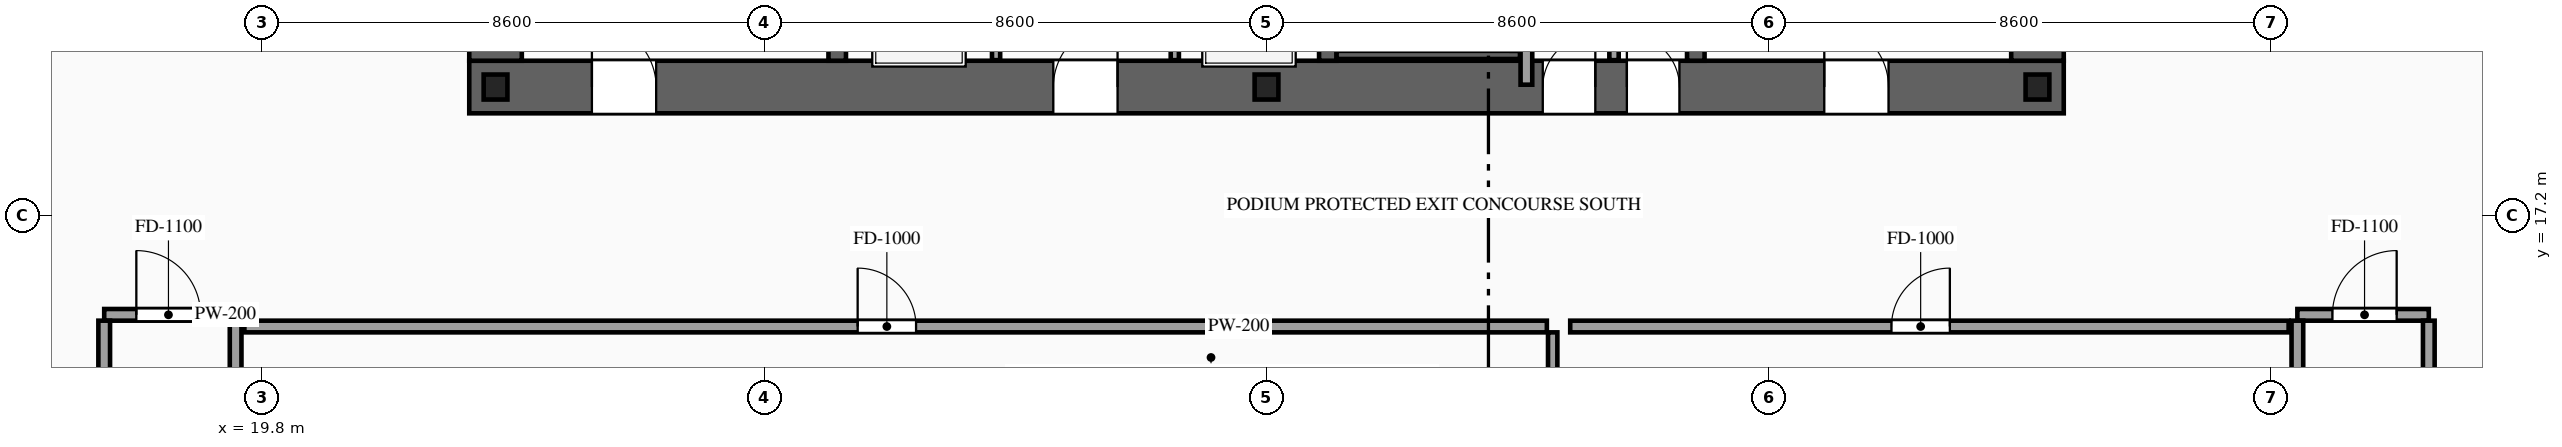
"""IFC4 building model, lengths in metres.
Left out: names, types, materials, properties, quantities, classifications, styles, units other than length and angle.
Written with IfcOpenShell. Run it as: python <this file> out.ifc"""

import sys

from ifc_helpers import new_model, si_unit, direction, frame, frame_2d, origin, origin_2d, place, context, subcontext, project, spatial, rectangle, i_section, extrude, source, transform, mapped, element, fill, save


model = new_model("IFC4")
c1 = context("Model", 3, precision=1e-05, world=origin(), true_north=direction((0.0, 1.0)))
c2 = subcontext(c1, "Body", "Model", "MODEL_VIEW")
j1 = project(units=[si_unit("LENGTHUNIT", "METRE"), si_unit("PLANEANGLEUNIT", "RADIAN")], contexts=[c1])
p1 = place(None, origin())
s1 = spatial("IfcSite", under=j1, at=p1, CompositionType="ELEMENT")
p2 = place(p1, origin())
s2 = spatial("IfcBuilding", under=s1, at=p2, CompositionType="ELEMENT")
p3 = place(p2, origin())
s3 = spatial("IfcBuildingStorey", under=s2, at=p3, CompositionType="ELEMENT", Elevation=0.0)
p4 = place(p3, frame((23.35, 19.4, 0.0), z_axis=(0.0, 0.0, 1.0), x_axis=(1.0, 0.0, 0.0)))
e1 = element("IfcWall", 1, at=p4, inside=s3, PredefinedType="SHEAR", context=c2, shape_type="SweptSolid", body=[
    extrude(rectangle(XDim=27.3, YDim=0.9, at=frame_2d((13.65, 0.0))), origin(), (0.0, 0.0, 1.0), 5.4),
])
p5 = place(p4, frame((2.1, 0.0, 0.0)))
e2 = element("IfcOpeningElement", 2, at=p5, cuts=e1, PredefinedType="OPENING", context=c2, shape_type="SweptSolid", body=[
    extrude(rectangle(XDim=1.1, YDim=2.2, at=frame_2d((0.55, 1.1))), frame((0.0, 0.465, 0.0), z_axis=(0.0, -1.0, 0.0), x_axis=(1.0, 0.0, 0.0)), (0.0, 0.0, 1.0), 0.93),
])
p6 = place(p4, frame((10.0, 0.0, 0.0)))
e3 = element("IfcOpeningElement", 3, at=p6, cuts=e1, PredefinedType="OPENING", context=c2, shape_type="SweptSolid", body=[
    extrude(rectangle(XDim=1.1, YDim=2.2, at=frame_2d((0.55, 1.1))), frame((0.0, 0.465, 0.0), z_axis=(0.0, -1.0, 0.0), x_axis=(1.0, 0.0, 0.0)), (0.0, 0.0, 1.0), 0.93),
])
p7 = place(p4, frame((23.2, 0.0, 0.0)))
e4 = element("IfcOpeningElement", 4, at=p7, cuts=e1, PredefinedType="OPENING", context=c2, shape_type="SweptSolid", body=[
    extrude(rectangle(XDim=1.1, YDim=2.2, at=frame_2d((0.55, 1.1))), frame((0.0, 0.465, 0.0), z_axis=(0.0, -1.0, 0.0), x_axis=(1.0, 0.0, 0.0)), (0.0, 0.0, 1.0), 0.93),
])
p8 = place(p4, frame((19.82, 0.0, 0.0)))
e5 = element("IfcOpeningElement", 5, at=p8, cuts=e1, PredefinedType="OPENING", context=c2, shape_type="SweptSolid", body=[
    extrude(rectangle(XDim=0.9, YDim=2.15, at=frame_2d((0.45, 1.075))), frame((0.0, 0.465, 0.0), z_axis=(0.0, -1.0, 0.0), x_axis=(1.0, 0.0, 0.0)), (0.0, 0.0, 1.0), 0.93),
])
p9 = place(p4, frame((18.38, 0.0, 0.0)))
e6 = element("IfcOpeningElement", 6, at=p9, cuts=e1, PredefinedType="OPENING", context=c2, shape_type="SweptSolid", body=[
    extrude(rectangle(XDim=0.9, YDim=2.15, at=frame_2d((0.45, 1.075))), frame((0.0, 0.465, 0.0), z_axis=(0.0, -1.0, 0.0), x_axis=(1.0, 0.0, 0.0)), (0.0, 0.0, 1.0), 0.93),
])
m1 = source(origin(), c2, "Body", "SweptSolid", [
    extrude(rectangle(XDim=11.9, YDim=0.9, at=frame_2d((5.95, 0.0))), origin(), (0.0, 0.0, 1.0), 5.4),
])
for number, where, z_axis, x_axis in (
    (7, (23.8, 19.85, 0.0), (0.0, 0.0, 1.0), (0.0, 1.0, 0.0)),
    (8, (50.2, 19.85, 0.0), (0.0, 0.0, 1.0), (0.0, 1.0, 0.0)),
):
    element("IfcWall", number, at=place(p3, frame(where, z_axis=z_axis, x_axis=x_axis)), inside=s3, PredefinedType="SHEAR", context=c2, shape_type="MappedRepresentation", body=[
        mapped(m1, transform((0.0, 0.0, 0.0), scale=1.0)),
    ])
m2 = source(origin(), c2, "Body", "SweptSolid", [
    extrude(rectangle(XDim=11.9, YDim=0.3, at=frame_2d((5.95, 0.0))), origin(), (0.0, 0.0, 1.0), 5.4),
])
for number, where, z_axis, x_axis in (
    (9, (29.65, 19.85, 0.0), (0.0, 0.0, 1.0), (0.0, 1.0, 0.0)),
    (10, (38.05, 19.85, 0.0), (0.0, 0.0, 1.0), (0.0, 1.0, 0.0)),
):
    element("IfcWall", number, at=place(p3, frame(where, z_axis=z_axis, x_axis=x_axis)), inside=s3, PredefinedType="SOLIDWALL", context=c2, shape_type="MappedRepresentation", body=[
        mapped(m2, transform((0.0, 0.0, 0.0), scale=1.0)),
    ])
p10 = place(p3, frame((44.35, 19.85, 0.0), z_axis=(0.0, 0.0, 1.0), x_axis=(0.0, 1.0, 0.0)))
e11 = element("IfcWall", 11, at=p10, inside=s3, PredefinedType="SOLIDWALL", context=c2, shape_type="SweptSolid", body=[
    extrude(rectangle(XDim=11.9, YDim=0.3, at=frame_2d((5.95, 0.0))), origin(), (0.0, 0.0, 1.0), 5.4),
])
p11 = place(p10, frame((6.35, 0.0, 0.0)))
e12 = element("IfcOpeningElement", 12, at=p11, cuts=e11, PredefinedType="OPENING", context=c2, shape_type="SweptSolid", body=[
    extrude(rectangle(XDim=1.1, YDim=2.2, at=frame_2d((0.55, 1.1))), frame((0.0, 0.165, 0.0), z_axis=(0.0, -1.0, 0.0), x_axis=(1.0, 0.0, 0.0)), (0.0, 0.0, 1.0), 0.33),
])
p12 = place(p10, frame((8.45, 0.0, 0.0)))
e13 = element("IfcOpeningElement", 13, at=p12, cuts=e11, PredefinedType="OPENING", context=c2, shape_type="SweptSolid", body=[
    extrude(rectangle(XDim=1.1, YDim=2.2, at=frame_2d((0.55, 1.1))), frame((0.0, 0.165, 0.0), z_axis=(0.0, -1.0, 0.0), x_axis=(1.0, 0.0, 0.0)), (0.0, 0.0, 1.0), 0.33),
])
p13 = place(p10, frame((10.55, 0.0, 0.0)))
e14 = element("IfcOpeningElement", 14, at=p13, cuts=e11, PredefinedType="OPENING", context=c2, shape_type="SweptSolid", body=[
    extrude(rectangle(XDim=1.1, YDim=2.2, at=frame_2d((0.55, 1.1))), frame((0.0, 0.165, 0.0), z_axis=(0.0, -1.0, 0.0), x_axis=(1.0, 0.0, 0.0)), (0.0, 0.0, 1.0), 0.33),
])
m3 = source(origin(), c2, "Body", "SweptSolid", [
    extrude(i_section(OverallWidth=0.407, OverallDepth=0.428, WebThickness=0.02, FlangeThickness=0.035, at=origin_2d()), origin(), (0.0, 0.0, 1.0), 5.4),
])
for number, where, z_axis, x_axis in (
    (15, (23.8, 19.4, 0.0), (0.0, 0.0, 1.0), (1.0, 0.0, 0.0)),
    (16, (37.0, 19.4, 0.0), (0.0, 0.0, 1.0), (1.0, 0.0, 0.0)),
    (17, (50.2, 19.4, 0.0), (0.0, 0.0, 1.0), (1.0, 0.0, 0.0)),
):
    element("IfcColumn", number, at=place(p3, frame(where, z_axis=z_axis, x_axis=x_axis)), inside=s3, PredefinedType="COLUMN", context=c2, shape_type="MappedRepresentation", body=[
        mapped(m3, transform((0.0, 0.0, 0.0), scale=1.0)),
    ])
p14 = place(p3, frame((32.37, 19.86, 0.0), z_axis=(0.0, 0.0, 1.0), x_axis=(0.0, 1.0, 0.0)))
e18 = element("IfcWall", 18, at=p14, inside=s3, PredefinedType="SOLIDWALL", context=c2, shape_type="SweptSolid", body=[
    extrude(rectangle(XDim=2.04, YDim=0.14, at=frame_2d((1.02, 0.0))), origin(), (0.0, 0.0, 1.0), 5.12),
])
p15 = place(p14, frame((0.47, 0.0, 0.0)))
e19 = element("IfcOpeningElement", 19, at=p15, cuts=e18, PredefinedType="OPENING", context=c2, shape_type="SweptSolid", body=[
    extrude(rectangle(XDim=1.1, YDim=2.2, at=frame_2d((0.55, 1.1))), frame((0.0, 0.085, 0.0), z_axis=(0.0, -1.0, 0.0), x_axis=(1.0, 0.0, 0.0)), (0.0, 0.0, 1.0), 0.17),
])
p16 = place(p3, frame((35.43, 19.86, 0.0), z_axis=(0.0, 0.0, 1.0), x_axis=(0.0, 1.0, 0.0)))
e20 = element("IfcWall", 20, at=p16, inside=s3, PredefinedType="SOLIDWALL", context=c2, shape_type="SweptSolid", body=[
    extrude(rectangle(XDim=2.04, YDim=0.14, at=frame_2d((1.02, 0.0))), origin(), (0.0, 0.0, 1.0), 5.12),
])
p17 = place(p16, frame((0.47, 0.0, 0.0)))
e21 = element("IfcOpeningElement", 21, at=p17, cuts=e20, PredefinedType="OPENING", context=c2, shape_type="SweptSolid", body=[
    extrude(rectangle(XDim=1.1, YDim=2.2, at=frame_2d((0.55, 1.1))), frame((0.0, 0.085, 0.0), z_axis=(0.0, -1.0, 0.0), x_axis=(1.0, 0.0, 0.0)), (0.0, 0.0, 1.0), 0.17),
])
m4 = source(origin(), c2, "Body", "SweptSolid", [
    extrude(rectangle(XDim=3.14, YDim=0.14, at=frame_2d((1.57, 0.0))), origin(), (0.0, 0.0, 1.0), 5.12),
])
p18 = place(p3, frame((38.2, 19.95, 0.0), z_axis=(0.0, 0.0, 1.0), x_axis=(1.0, 0.0, 0.0)))
e22 = element("IfcWall", 22, at=p18, inside=s3, PredefinedType="SOLIDWALL", context=c2, shape_type="MappedRepresentation", body=[
    mapped(m4, transform((0.0, 0.0, 0.0), scale=1.0)),
])
m5 = source(origin(), c2, "Body", "SweptSolid", [
    extrude(rectangle(XDim=1.34, YDim=0.16, at=frame_2d((0.67, 0.0))), origin(), (0.0, 0.0, 1.0), 5.12),
])
p19 = place(p3, frame((42.95, 19.86, 0.0), z_axis=(0.0, 0.0, 1.0), x_axis=(0.0, 1.0, 0.0)))
e23 = element("IfcWall", 23, at=p19, inside=s3, PredefinedType="PARTITIONING", context=c2, shape_type="MappedRepresentation", body=[
    mapped(m5, transform((0.0, 0.0, 0.0), scale=1.0)),
])
m6 = source(origin(), c2, "Body", "SweptSolid", [
    extrude(rectangle(XDim=6.06, YDim=0.2, at=frame_2d((3.03, 0.0))), origin(), (0.0, 0.0, 1.0), 5.12),
])
p20 = place(p3, frame((41.45, 19.44, 0.0), z_axis=(0.0, 0.0, 1.0), x_axis=(0.0, 1.0, 0.0)))
e24 = element("IfcWall", 24, at=p20, inside=s3, PredefinedType="PARTITIONING", context=c2, shape_type="MappedRepresentation", body=[
    mapped(m6, transform((0.0, 0.0, 0.0), scale=1.0)),
])
p21 = place(p3, frame((17.1, 15.5, 0.0), z_axis=(0.0, 0.0, 1.0), x_axis=(1.0, 0.0, 0.0)))
e25 = element("IfcWall", 25, at=p21, inside=s3, PredefinedType="PARTITIONING", context=c2, shape_type="SweptSolid", body=[
    extrude(rectangle(XDim=2.25, YDim=0.2, at=frame_2d((1.125, 0.0))), origin(), (0.0, 0.0, 1.0), 5.12),
])
p22 = place(p21, frame((0.55, 0.0, 0.0)))
e26 = element("IfcOpeningElement", 26, at=p22, cuts=e25, PredefinedType="OPENING", context=c2, shape_type="SweptSolid", body=[
    extrude(rectangle(XDim=1.1, YDim=2.2, at=frame_2d((0.55, 1.1))), frame((0.0, 0.115, 0.0), z_axis=(0.0, -1.0, 0.0), x_axis=(1.0, 0.0, 0.0)), (0.0, 0.0, 1.0), 0.23),
])
m7 = source(origin(), c2, "Body", "SweptSolid", [
    extrude(rectangle(XDim=13.22, YDim=0.2, at=frame_2d((6.61, 0.0))), origin(), (0.0, 0.0, 1.0), 5.12),
])
p23 = place(p3, frame((19.35, 2.18, 0.0), z_axis=(0.0, 0.0, 1.0), x_axis=(0.0, 1.0, 0.0)))
e27 = element("IfcWall", 27, at=p23, inside=s3, PredefinedType="PARTITIONING", context=c2, shape_type="MappedRepresentation", body=[
    mapped(m7, transform((0.0, 0.0, 0.0), scale=1.0)),
])
m8 = source(origin(), c2, "Body", "SweptSolid", [
    extrude(rectangle(XDim=2.55, YDim=0.2, at=frame_2d((1.275, 0.0))), origin(), (0.0, 0.0, 1.0), 5.12),
])
p24 = place(p3, frame((17.1, 12.85, 0.0), z_axis=(0.0, 0.0, 1.0), x_axis=(0.0, 1.0, 0.0)))
e28 = element("IfcWall", 28, at=p24, inside=s3, PredefinedType="PARTITIONING", context=c2, shape_type="MappedRepresentation", body=[
    mapped(m8, transform((0.0, 0.0, 0.0), scale=1.0)),
])
p25 = place(p3, frame((54.65, 15.5, 0.0), z_axis=(0.0, 0.0, 1.0), x_axis=(1.0, 0.0, 0.0)))
e29 = element("IfcWall", 29, at=p25, inside=s3, PredefinedType="PARTITIONING", context=c2, shape_type="SweptSolid", body=[
    extrude(rectangle(XDim=2.25, YDim=0.2, at=frame_2d((1.125, 0.0))), origin(), (0.0, 0.0, 1.0), 5.12),
])
p26 = place(p25, frame((0.6, 0.0, 0.0)))
e30 = element("IfcOpeningElement", 30, at=p26, cuts=e29, PredefinedType="OPENING", context=c2, shape_type="SweptSolid", body=[
    extrude(rectangle(XDim=1.1, YDim=2.2, at=frame_2d((0.55, 1.1))), frame((0.0, 0.115, 0.0), z_axis=(0.0, -1.0, 0.0), x_axis=(1.0, 0.0, 0.0)), (0.0, 0.0, 1.0), 0.23),
])
m9 = source(origin(), c2, "Body", "SweptSolid", [
    extrude(rectangle(XDim=13.42, YDim=0.2, at=frame_2d((6.71, 0.0))), origin(), (0.0, 0.0, 1.0), 5.12),
])
p27 = place(p3, frame((54.65, 1.98, 0.0), z_axis=(0.0, 0.0, 1.0), x_axis=(0.0, 1.0, 0.0)))
e31 = element("IfcWall", 31, at=p27, inside=s3, PredefinedType="PARTITIONING", context=c2, shape_type="MappedRepresentation", body=[
    mapped(m9, transform((0.0, 0.0, 0.0), scale=1.0)),
])
p28 = place(p3, frame((56.9, 12.85, 0.0), z_axis=(0.0, 0.0, 1.0), x_axis=(0.0, 1.0, 0.0)))
e32 = element("IfcWall", 32, at=p28, inside=s3, PredefinedType="PARTITIONING", context=c2, shape_type="MappedRepresentation", body=[
    mapped(m8, transform((0.0, 0.0, 0.0), scale=1.0)),
])
p29 = place(p3, frame((19.5, 15.3, 0.0), z_axis=(0.0, 0.0, 1.0), x_axis=(1.0, 0.0, 0.0)))
e33 = element("IfcWall", 33, at=p29, inside=s3, PredefinedType="PARTITIONING", context=c2, shape_type="SweptSolid", body=[
    extrude(rectangle(XDim=22.3, YDim=0.2, at=frame_2d((11.15, 0.0))), origin(), (0.0, 0.0, 1.0), 5.12),
])
p30 = place(p29, frame((10.5, 0.0, 0.0)))
e34 = element("IfcOpeningElement", 34, at=p30, cuts=e33, PredefinedType="OPENING", context=c2, shape_type="SweptSolid", body=[
    extrude(rectangle(XDim=1.0, YDim=2.2, at=frame_2d((0.5, 1.1))), frame((0.0, 0.115, 0.0), z_axis=(0.0, -1.0, 0.0), x_axis=(1.0, 0.0, 0.0)), (0.0, 0.0, 1.0), 0.23),
])
m10 = source(origin(), c2, "Body", "SweptSolid", [
    extrude(rectangle(XDim=13.22, YDim=0.16, at=frame_2d((6.61, 0.0))), origin(), (0.0, 0.0, 1.0), 5.12),
])
p31 = place(p3, frame((41.9, 1.98, 0.0), z_axis=(0.0, 0.0, 1.0), x_axis=(0.0, 1.0, 0.0)))
e35 = element("IfcWall", 35, at=p31, inside=s3, PredefinedType="PARTITIONING", context=c2, shape_type="MappedRepresentation", body=[
    mapped(m10, transform((0.0, 0.0, 0.0), scale=1.0)),
])
p32 = place(p3, frame((42.2, 15.3, 0.0), z_axis=(0.0, 0.0, 1.0), x_axis=(1.0, 0.0, 0.0)))
e36 = element("IfcWall", 36, at=p32, inside=s3, PredefinedType="PARTITIONING", context=c2, shape_type="SweptSolid", body=[
    extrude(rectangle(XDim=12.3, YDim=0.2, at=frame_2d((6.15, 0.0))), origin(), (0.0, 0.0, 1.0), 5.12),
])
p33 = place(p32, frame((5.5, 0.0, 0.0)))
e37 = element("IfcOpeningElement", 37, at=p33, cuts=e36, PredefinedType="OPENING", context=c2, shape_type="SweptSolid", body=[
    extrude(rectangle(XDim=1.0, YDim=2.2, at=frame_2d((0.5, 1.1))), frame((0.0, 0.115, 0.0), z_axis=(0.0, -1.0, 0.0), x_axis=(1.0, 0.0, 0.0)), (0.0, 0.0, 1.0), 0.23),
])
m11 = source(origin(), c2, "Body", "SweptSolid", [
    extrude(rectangle(XDim=1.1, YDim=2.2, at=frame_2d((0.55, 1.1))), frame((0.0, 0.025, 0.0), z_axis=(0.0, -1.0, 0.0), x_axis=(1.0, 0.0, 0.0)), (0.0, 0.0, 1.0), 0.05),
])
p34 = place(p5, origin())
e38 = element("IfcDoor", 38, at=p34, inside=s3, OperationType="SINGLE_SWING_LEFT", PredefinedType="DOOR", context=c2, shape_type="MappedRepresentation", body=[
    mapped(m11, transform((0.0, 0.0, 0.0), scale=1.0)),
])
fill(e2, e38)
p35 = place(p6, origin())
e39 = element("IfcDoor", 39, at=p35, inside=s3, OperationType="SINGLE_SWING_RIGHT", PredefinedType="DOOR", context=c2, shape_type="MappedRepresentation", body=[
    mapped(m11, transform((0.0, 0.0, 0.0), scale=1.0)),
])
fill(e3, e39)
p36 = place(p7, origin())
e40 = element("IfcDoor", 40, at=p36, inside=s3, OperationType="SINGLE_SWING_LEFT", PredefinedType="DOOR", context=c2, shape_type="MappedRepresentation", body=[
    mapped(m11, transform((0.0, 0.0, 0.0), scale=1.0)),
])
fill(e4, e40)
m12 = source(origin(), c2, "Body", "SweptSolid", [
    extrude(rectangle(XDim=0.9, YDim=2.15, at=frame_2d((0.45, 1.075))), frame((0.0, 0.025, 0.0), z_axis=(0.0, -1.0, 0.0), x_axis=(1.0, 0.0, 0.0)), (0.0, 0.0, 1.0), 0.05),
])
p37 = place(p8, origin())
e41 = element("IfcDoor", 41, at=p37, inside=s3, OperationType="SINGLE_SWING_LEFT", PredefinedType="DOOR", context=c2, shape_type="MappedRepresentation", body=[
    mapped(m12, transform((0.0, 0.0, 0.0), scale=1.0)),
])
fill(e5, e41)
p38 = place(p9, origin())
e42 = element("IfcDoor", 42, at=p38, inside=s3, OperationType="SINGLE_SWING_RIGHT", PredefinedType="DOOR", context=c2, shape_type="MappedRepresentation", body=[
    mapped(m12, transform((0.0, 0.0, 0.0), scale=1.0)),
])
fill(e6, e42)
p39 = place(p22, origin())
e43 = element("IfcDoor", 43, at=p39, inside=s3, OperationType="SINGLE_SWING_LEFT", PredefinedType="DOOR", context=c2, shape_type="MappedRepresentation", body=[
    mapped(m11, transform((0.0, 0.0, 0.0), scale=1.0)),
])
fill(e26, e43)
p40 = place(p26, origin())
e44 = element("IfcDoor", 44, at=p40, inside=s3, OperationType="SINGLE_SWING_RIGHT", PredefinedType="DOOR", context=c2, shape_type="MappedRepresentation", body=[
    mapped(m11, transform((0.0, 0.0, 0.0), scale=1.0)),
])
fill(e30, e44)
m13 = source(origin(), c2, "Body", "SweptSolid", [
    extrude(rectangle(XDim=1.0, YDim=2.2, at=frame_2d((0.5, 1.1))), frame((0.0, 0.025, 0.0), z_axis=(0.0, -1.0, 0.0), x_axis=(1.0, 0.0, 0.0)), (0.0, 0.0, 1.0), 0.05),
])
p41 = place(p30, origin())
e45 = element("IfcDoor", 45, at=p41, inside=s3, OperationType="SINGLE_SWING_LEFT", PredefinedType="DOOR", context=c2, shape_type="MappedRepresentation", body=[
    mapped(m13, transform((0.0, 0.0, 0.0), scale=1.0)),
])
fill(e34, e45)
p42 = place(p33, origin())
e46 = element("IfcDoor", 46, at=p42, inside=s3, OperationType="SINGLE_SWING_RIGHT", PredefinedType="DOOR", context=c2, shape_type="MappedRepresentation", body=[
    mapped(m13, transform((0.0, 0.0, 0.0), scale=1.0)),
])
fill(e37, e46)
save(model, sys.argv[1])
